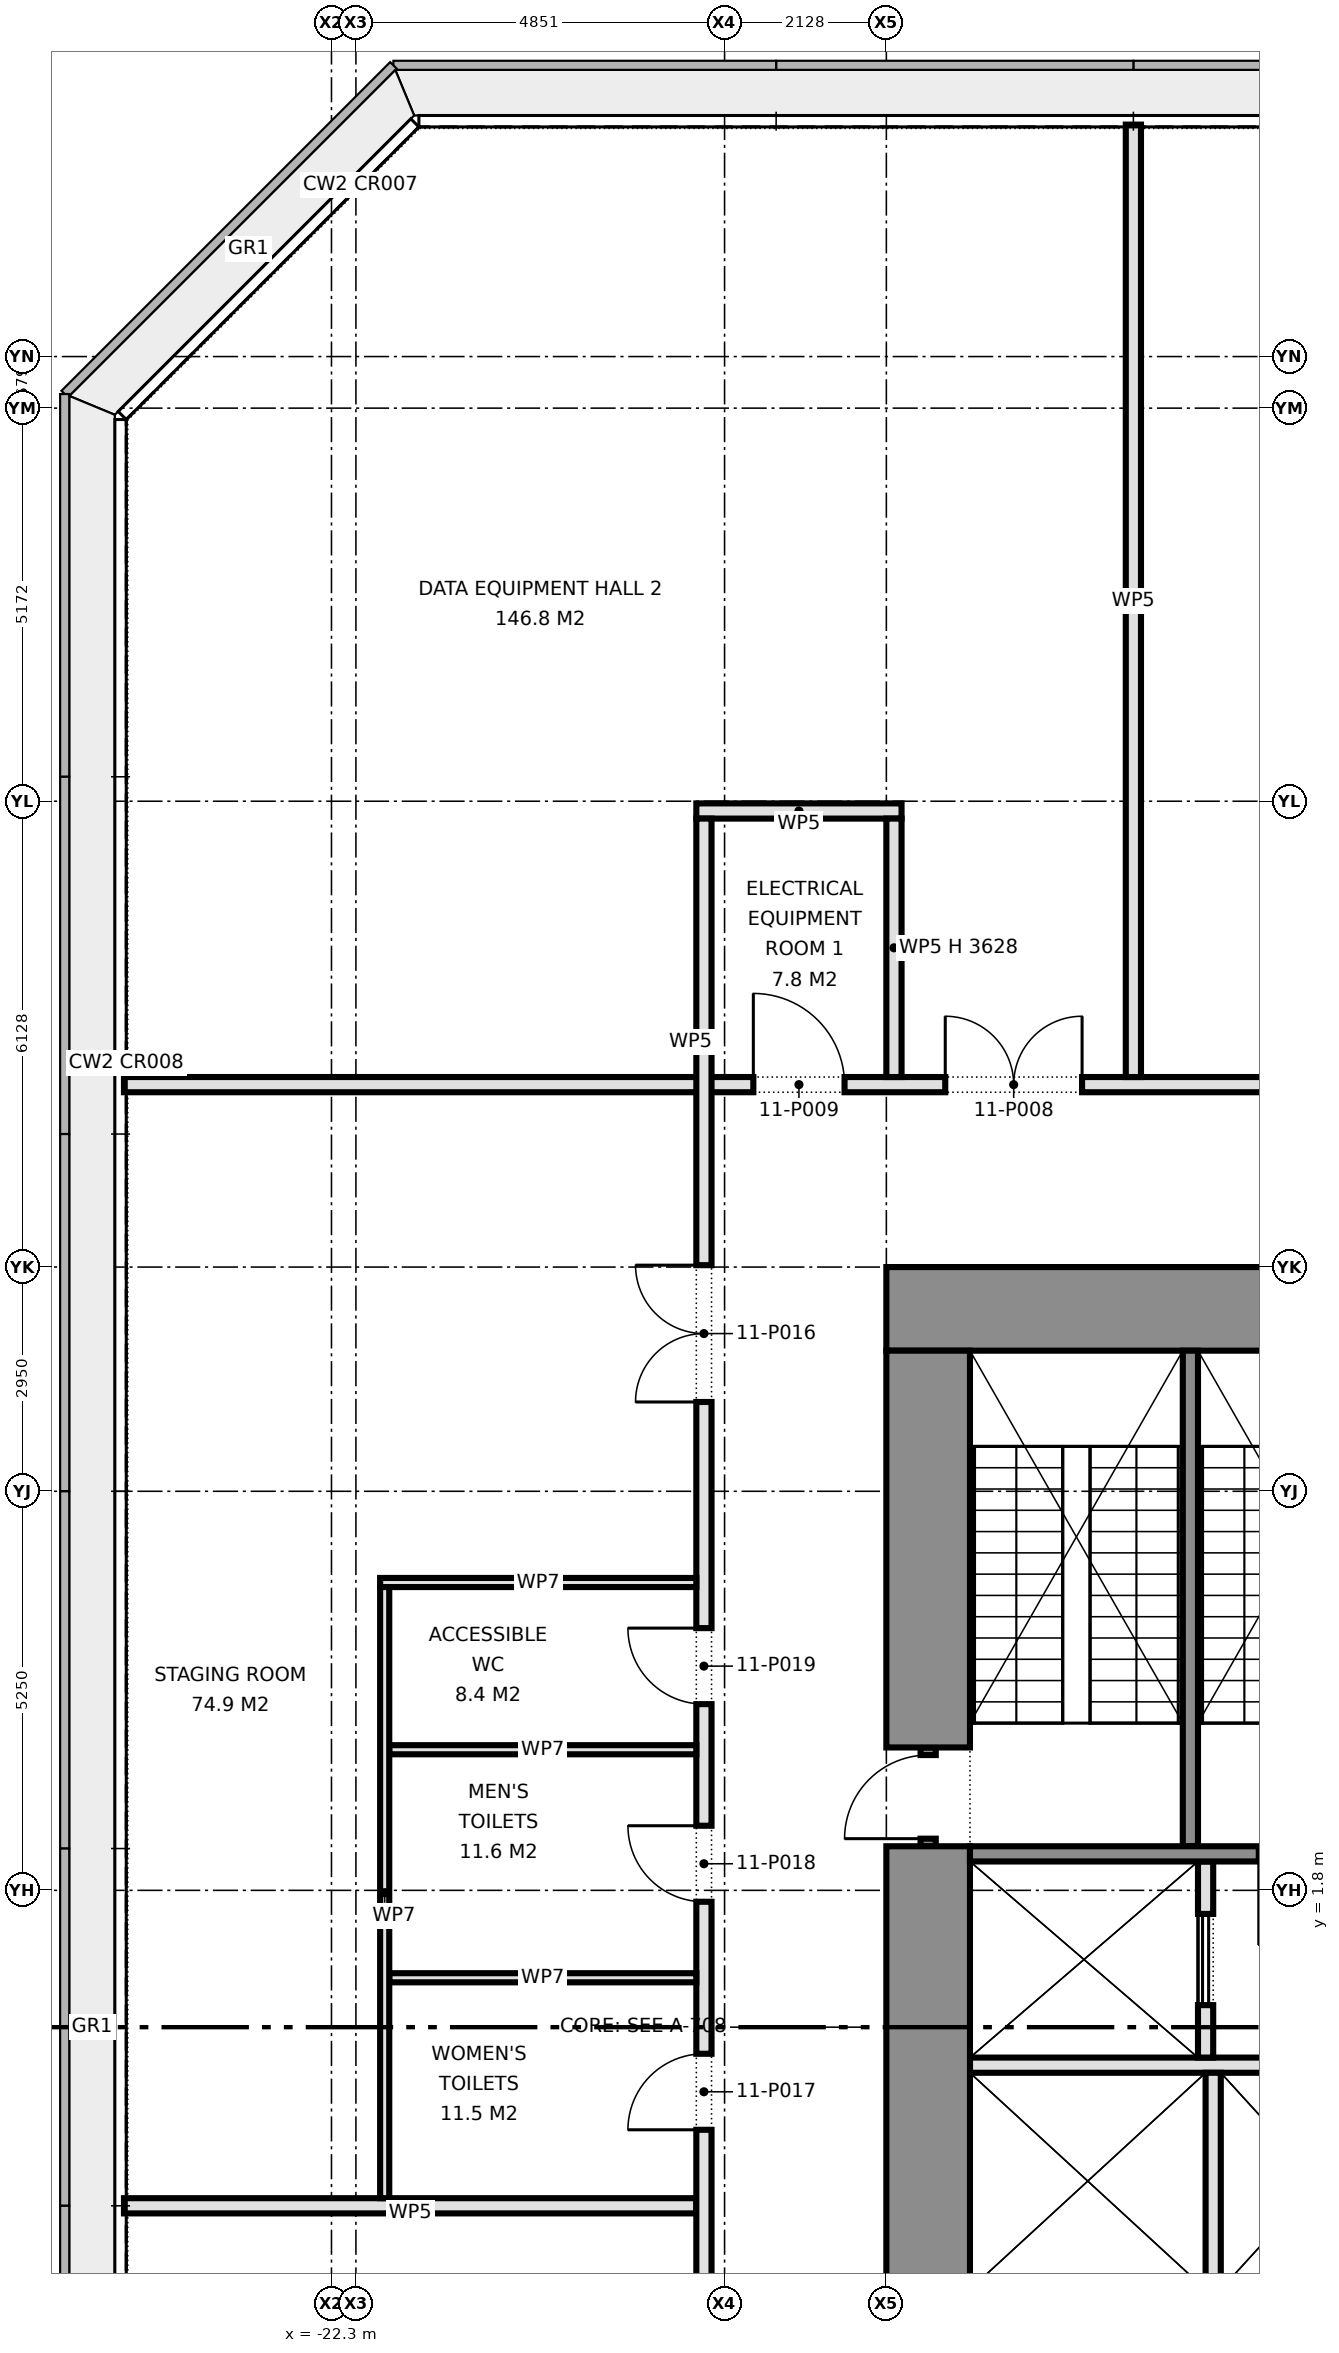
"""IFC4 building model, lengths in metres.
Left out: names, types, materials, properties, quantities, classifications, styles, units other than length and angle.
Written with IfcOpenShell. Run it as: python <this file> out.ifc"""

import sys

from ifc_helpers import new_model, si_unit, direction, frame, frame_2d, origin, place, context, subcontext, project, spatial, rectangle, extrude, element, fill, save


model = new_model("IFC4")
c1 = context("Model", 3, precision=1e-05, world=origin(), true_north=direction((0.0, 1.0)))
c2 = subcontext(c1, "Body", "Model", "MODEL_VIEW")
j1 = project(units=[si_unit("LENGTHUNIT", "METRE"), si_unit("PLANEANGLEUNIT", "RADIAN")], contexts=[c1])
p1 = place(None, origin())
s1 = spatial("IfcSite", under=j1, at=p1, CompositionType="ELEMENT")
p2 = place(p1, origin())
s2 = spatial("IfcBuilding", under=s1, at=p2, CompositionType="ELEMENT")
p3 = place(p2, frame((0.0, 0.0, 49.7)))
s3 = spatial("IfcBuildingStorey", under=s2, at=p3, CompositionType="ELEMENT", Elevation=49.7)
p4 = place(p3, frame((-15.0, 9.45, 0.0), z_axis=(0.0, 0.0, 1.0), x_axis=(1.0, 0.0, 0.0)))
e1 = element("IfcWall", 1, at=p4, inside=s3, PredefinedType="SHEAR", context=c2, shape_type="SweptSolid", body=[
    extrude(rectangle(XDim=11.0, YDim=1.1, at=frame_2d((5.5, 0.0))), origin(), (0.0, 0.0, 1.0), 4.575),
])
p5 = place(p3, frame((-14.45, -3.75, 0.0), z_axis=(0.0, 0.0, 1.0), x_axis=(0.0, 1.0, 0.0)))
e2 = element("IfcWall", 2, at=p5, inside=s3, PredefinedType="SHEAR", context=c2, shape_type="SweptSolid", body=[
    extrude(rectangle(XDim=6.13, YDim=1.1, at=frame_2d((3.065, 0.0))), origin(), (0.0, 0.0, 1.0), 4.575),
])
p6 = place(p3, frame((-14.45, 2.38, 0.0), z_axis=(0.0, 0.0, 1.0), x_axis=(0.0, 1.0, 0.0)))
e3 = element("IfcWall", 3, at=p6, inside=s3, PredefinedType="SHEAR", context=c2, shape_type="SweptSolid", body=[
    extrude(rectangle(XDim=1.3, YDim=0.2, at=frame_2d((0.65, 0.0))), origin(), (0.0, 0.0, 1.0), 2.4),
])
p7 = place(p6, frame((0.1, 0.0, 0.0)))
e4 = element("IfcOpeningElement", 4, at=p7, cuts=e3, PredefinedType="OPENING", context=c2, shape_type="SweptSolid", body=[
    extrude(rectangle(XDim=1.1, YDim=2.1, at=frame_2d((0.55, 1.05))), frame((0.0, 0.11, 0.0), z_axis=(0.0, -1.0, 0.0), x_axis=(1.0, 0.0, 0.0)), (0.0, 0.0, 1.0), 0.22),
])
p8 = place(p3, frame((-14.45, 3.68, 0.0), z_axis=(0.0, 0.0, 1.0), x_axis=(0.0, 1.0, 0.0)))
e5 = element("IfcWall", 5, at=p8, inside=s3, PredefinedType="SHEAR", context=c2, shape_type="SweptSolid", body=[
    extrude(rectangle(XDim=5.22, YDim=1.1, at=frame_2d((2.61, 0.0))), origin(), (0.0, 0.0, 1.0), 4.575),
])
p9 = place(p3, frame((-13.9, -0.5, 0.0), z_axis=(0.0, 0.0, 1.0), x_axis=(1.0, 0.0, 0.0)))
e6 = element("IfcWall", 6, at=p9, inside=s3, PredefinedType="PARTITIONING", context=c2, shape_type="SweptSolid", body=[
    extrude(rectangle(XDim=8.8, YDim=0.2, at=frame_2d((4.4, 0.0))), origin(), (0.0, 0.0, 1.0), 4.575),
])
p10 = place(p3, frame((-10.8, -0.4, 0.0), z_axis=(0.0, 0.0, 1.0), x_axis=(0.0, 1.0, 0.0)))
e7 = element("IfcWall", 7, at=p10, inside=s3, PredefinedType="PARTITIONING", context=c2, shape_type="SweptSolid", body=[
    extrude(rectangle(XDim=2.58, YDim=0.2, at=frame_2d((1.29, 0.0))), origin(), (0.0, 0.0, 1.0), 4.575),
])
p11 = place(p10, frame((0.69, 0.0, 0.0)))
e8 = element("IfcOpeningElement", 8, at=p11, cuts=e7, PredefinedType="OPENING", context=c2, shape_type="SweptSolid", body=[
    extrude(rectangle(XDim=1.2, YDim=2.1, at=frame_2d((0.6, 1.05))), frame((0.0, 0.11, 0.0), z_axis=(0.0, -1.0, 0.0), x_axis=(1.0, 0.0, 0.0)), (0.0, 0.0, 1.0), 0.22),
])
p12 = place(p3, frame((-13.9, 2.28, 0.0), z_axis=(0.0, 0.0, 1.0), x_axis=(1.0, 0.0, 0.0)))
e9 = element("IfcWall", 9, at=p12, inside=s3, PredefinedType="SHEAR", context=c2, shape_type="SweptSolid", body=[
    extrude(rectangle(XDim=8.8, YDim=0.2, at=frame_2d((4.4, 0.0))), origin(), (0.0, 0.0, 1.0), 4.575),
])
p13 = place(p12, frame((3.8, 0.0, 0.0)))
e10 = element("IfcOpeningElement", 10, at=p13, cuts=e9, PredefinedType="OPENING", context=c2, shape_type="SweptSolid", body=[
    extrude(rectangle(XDim=1.2, YDim=2.1, at=frame_2d((0.6, 1.05))), frame((0.0, 0.11, 0.0), z_axis=(0.0, -1.0, 0.0), x_axis=(1.0, 0.0, 0.0)), (0.0, 0.0, 1.0), 0.22),
])
p14 = place(p12, frame((6.8, 0.0, 0.0)))
e11 = element("IfcOpeningElement", 11, at=p14, cuts=e9, PredefinedType="OPENING", context=c2, shape_type="SweptSolid", body=[
    extrude(rectangle(XDim=1.2, YDim=2.1, at=frame_2d((0.6, 1.05))), frame((0.0, 0.11, 0.0), z_axis=(0.0, -1.0, 0.0), x_axis=(1.0, 0.0, 0.0)), (0.0, 0.0, 1.0), 0.22),
])
p15 = place(p3, frame((-11.0, 2.38, 0.0), z_axis=(0.0, 0.0, 1.0), x_axis=(0.0, 1.0, 0.0)))
e12 = element("IfcWall", 12, at=p15, inside=s3, PredefinedType="SHEAR", context=c2, shape_type="SweptSolid", body=[
    extrude(rectangle(XDim=6.52, YDim=0.2, at=frame_2d((3.26, 0.0))), origin(), (0.0, 0.0, 1.0), 4.575),
])
p16 = place(p3, frame((-10.7, -3.45, 0.0), z_axis=(0.0, 0.0, 1.0), x_axis=(0.0, 1.0, 0.0)))
e13 = element("IfcWall", 13, at=p16, inside=s3, PredefinedType="PARTITIONING", context=c2, shape_type="SweptSolid", body=[
    extrude(rectangle(XDim=2.85, YDim=0.2, at=frame_2d((1.425, 0.0))), origin(), (0.0, 0.0, 1.0), 4.575),
])
p17 = place(p3, frame((-25.03, -2.35, 0.0), z_axis=(0.0, 0.0, 1.0), x_axis=(1.0, 0.0, 0.0)))
e14 = element("IfcWall", 14, at=p17, inside=s3, PredefinedType="PARTITIONING", context=c2, shape_type="SweptSolid", body=[
    extrude(rectangle(XDim=7.53, YDim=0.2, at=frame_2d((3.765, 0.0))), origin(), (0.0, 0.0, 1.0), 4.575),
])
p18 = place(p3, frame((-25.03, 12.4, 0.0), z_axis=(0.0, 0.0, 1.0), x_axis=(1.0, 0.0, 0.0)))
e15 = element("IfcWall", 15, at=p18, inside=s3, PredefinedType="PARTITIONING", context=c2, shape_type="SweptSolid", body=[
    extrude(rectangle(XDim=50.06, YDim=0.2, at=frame_2d((25.03, 0.0))), origin(), (0.0, 0.0, 1.0), 4.575),
])
p19 = place(p18, frame((10.805, 0.0, 0.0)))
e16 = element("IfcOpeningElement", 16, at=p19, cuts=e15, PredefinedType="OPENING", context=c2, shape_type="SweptSolid", body=[
    extrude(rectangle(XDim=1.8, YDim=2.1, at=frame_2d((0.9, 1.05))), frame((0.0, 0.11, 0.0), z_axis=(0.0, -1.0, 0.0), x_axis=(1.0, 0.0, 0.0)), (0.0, 0.0, 1.0), 0.22),
])
p20 = place(p18, frame((8.28, 0.0, 0.0)))
e17 = element("IfcOpeningElement", 17, at=p20, cuts=e15, PredefinedType="OPENING", context=c2, shape_type="SweptSolid", body=[
    extrude(rectangle(XDim=1.2, YDim=2.1, at=frame_2d((0.6, 1.05))), frame((0.0, 0.11, 0.0), z_axis=(0.0, -1.0, 0.0), x_axis=(1.0, 0.0, 0.0)), (0.0, 0.0, 1.0), 0.22),
])
p21 = place(p18, frame((21.78, 0.0, 0.0)))
e18 = element("IfcOpeningElement", 18, at=p21, cuts=e15, PredefinedType="OPENING", context=c2, shape_type="SweptSolid", body=[
    extrude(rectangle(XDim=1.8, YDim=2.1, at=frame_2d((0.9, 1.05))), frame((0.0, 0.11, 0.0), z_axis=(0.0, -1.0, 0.0), x_axis=(1.0, 0.0, 0.0)), (0.0, 0.0, 1.0), 0.22),
])
p22 = place(p18, frame((36.36, 0.0, 0.0)))
e19 = element("IfcOpeningElement", 19, at=p22, cuts=e15, PredefinedType="OPENING", context=c2, shape_type="SweptSolid", body=[
    extrude(rectangle(XDim=1.8, YDim=2.1, at=frame_2d((0.9, 1.05))), frame((0.0, 0.11, 0.0), z_axis=(0.0, -1.0, 0.0), x_axis=(1.0, 0.0, 0.0)), (0.0, 0.0, 1.0), 0.22),
])
p23 = place(p3, frame((-17.5, 16.0, 0.0), z_axis=(0.0, 0.0, 1.0), x_axis=(1.0, 0.0, 0.0)))
e20 = element("IfcWall", 20, at=p23, inside=s3, PredefinedType="PARTITIONING", context=c2, shape_type="SweptSolid", body=[
    extrude(rectangle(XDim=2.7, YDim=0.2, at=frame_2d((1.35, 0.0))), origin(), (0.0, 0.0, 1.0), 4.575),
])
p24 = place(p3, frame((-11.75, 12.5, 0.0), z_axis=(0.0, 0.0, 1.0), x_axis=(0.0, 1.0, 0.0)))
e21 = element("IfcWall", 21, at=p24, inside=s3, PredefinedType="PARTITIONING", context=c2, shape_type="SweptSolid", body=[
    extrude(rectangle(XDim=12.53, YDim=0.2, at=frame_2d((6.265, 0.0))), origin(), (0.0, 0.0, 1.0), 4.575),
])
p25 = place(p3, frame((-14.9, 12.5, 0.0), z_axis=(0.0, 0.0, 1.0), x_axis=(0.0, 1.0, 0.0)))
e22 = element("IfcWall", 22, at=p25, inside=s3, PredefinedType="PARTITIONING", context=c2, shape_type="SweptSolid", body=[
    extrude(rectangle(XDim=3.4, YDim=0.2, at=frame_2d((1.7, 0.0))), origin(), (0.0, 0.0, 1.0), 3.628),
])
p26 = place(p3, frame((-17.4, -12.3, 0.0), z_axis=(0.0, 0.0, 1.0), x_axis=(0.0, 1.0, 0.0)))
e23 = element("IfcWall", 23, at=p26, inside=s3, PredefinedType="PARTITIONING", context=c2, shape_type="SweptSolid", body=[
    extrude(rectangle(XDim=28.2, YDim=0.2, at=frame_2d((14.1, 0.0))), origin(), (0.0, 0.0, 1.0), 4.575),
])
p27 = place(p26, frame((4.025, 0.0, 0.0)))
e24 = element("IfcOpeningElement", 24, at=p27, cuts=e23, PredefinedType="OPENING", context=c2, shape_type="SweptSolid", body=[
    extrude(rectangle(XDim=1.8, YDim=2.1, at=frame_2d((0.9, 1.05))), frame((0.0, 0.11, 0.0), z_axis=(0.0, -1.0, 0.0), x_axis=(1.0, 0.0, 0.0)), (0.0, 0.0, 1.0), 0.22),
])
p28 = place(p26, frame((20.525, 0.0, 0.0)))
e25 = element("IfcOpeningElement", 25, at=p28, cuts=e23, PredefinedType="OPENING", context=c2, shape_type="SweptSolid", body=[
    extrude(rectangle(XDim=1.8, YDim=2.1, at=frame_2d((0.9, 1.05))), frame((0.0, 0.11, 0.0), z_axis=(0.0, -1.0, 0.0), x_axis=(1.0, 0.0, 0.0)), (0.0, 0.0, 1.0), 0.22),
])
p29 = place(p26, frame((10.95, 0.0, 0.0)))
e26 = element("IfcOpeningElement", 26, at=p29, cuts=e23, PredefinedType="OPENING", context=c2, shape_type="SweptSolid", body=[
    extrude(rectangle(XDim=1.0, YDim=2.1, at=frame_2d((0.5, 1.05))), frame((0.0, 0.11, 0.0), z_axis=(0.0, -1.0, 0.0), x_axis=(1.0, 0.0, 0.0)), (0.0, 0.0, 1.0), 0.22),
])
p30 = place(p26, frame((13.95, 0.0, 0.0)))
e27 = element("IfcOpeningElement", 27, at=p30, cuts=e23, PredefinedType="OPENING", context=c2, shape_type="SweptSolid", body=[
    extrude(rectangle(XDim=1.0, YDim=2.1, at=frame_2d((0.5, 1.05))), frame((0.0, 0.11, 0.0), z_axis=(0.0, -1.0, 0.0), x_axis=(1.0, 0.0, 0.0)), (0.0, 0.0, 1.0), 0.22),
])
p31 = place(p26, frame((16.55, 0.0, 0.0)))
e28 = element("IfcOpeningElement", 28, at=p31, cuts=e23, PredefinedType="OPENING", context=c2, shape_type="SweptSolid", body=[
    extrude(rectangle(XDim=1.0, YDim=2.1, at=frame_2d((0.5, 1.05))), frame((0.0, 0.11, 0.0), z_axis=(0.0, -1.0, 0.0), x_axis=(1.0, 0.0, 0.0)), (0.0, 0.0, 1.0), 0.22),
])
for number, where, z_axis, x_axis in (
    (29, (-21.54, 0.65, 0.0), (0.0, 0.0, 1.0), (1.0, 0.0, 0.0)),
    (30, (-21.54, 3.65, 0.0), (0.0, 0.0, 1.0), (1.0, 0.0, 0.0)),
):
    element("IfcWall", number, at=place(p3, frame(where, z_axis=z_axis, x_axis=x_axis)), inside=s3, PredefinedType="PARTITIONING", context=c2, shape_type="SweptSolid", body=[
        extrude(rectangle(XDim=4.04, YDim=0.12, at=frame_2d((2.02, 0.0))), origin(), (0.0, 0.0, 1.0), 4.575),
    ])
p32 = place(p3, frame((-21.66, 5.85, 0.0), z_axis=(0.0, 0.0, 1.0), x_axis=(1.0, 0.0, 0.0)))
e31 = element("IfcWall", 31, at=p32, inside=s3, PredefinedType="PARTITIONING", context=c2, shape_type="SweptSolid", body=[
    extrude(rectangle(XDim=4.16, YDim=0.12, at=frame_2d((2.08, 0.0))), origin(), (0.0, 0.0, 1.0), 4.575),
])
p33 = place(p3, frame((-21.6, -2.25, 0.0), z_axis=(0.0, 0.0, 1.0), x_axis=(0.0, 1.0, 0.0)))
e32 = element("IfcWall", 32, at=p33, inside=s3, PredefinedType="PARTITIONING", context=c2, shape_type="SweptSolid", body=[
    extrude(rectangle(XDim=8.04, YDim=0.12, at=frame_2d((4.02, 0.0))), origin(), (0.0, 0.0, 1.0), 4.575),
])
p34 = place(p7, origin())
e33 = element("IfcDoor", 33, at=p34, inside=s3, OperationType="SINGLE_SWING_LEFT", PredefinedType="DOOR", context=c2, shape_type="SweptSolid", body=[
    extrude(rectangle(XDim=1.1, YDim=2.1, at=frame_2d((0.55, 1.05))), frame((0.0, 0.025, 0.0), z_axis=(0.0, -1.0, 0.0), x_axis=(1.0, 0.0, 0.0)), (0.0, 0.0, 1.0), 0.05),
])
fill(e4, e33)
p35 = place(p11, origin())
e34 = element("IfcDoor", 34, at=p35, inside=s3, OperationType="DOUBLE_DOOR_SLIDING", PredefinedType="DOOR", context=c2, shape_type="SweptSolid", body=[
    extrude(rectangle(XDim=1.2, YDim=2.1, at=frame_2d((0.6, 1.05))), frame((0.0, 0.025, 0.0), z_axis=(0.0, -1.0, 0.0), x_axis=(1.0, 0.0, 0.0)), (0.0, 0.0, 1.0), 0.05),
])
fill(e8, e34)
p36 = place(p19, origin())
e35 = element("IfcDoor", 35, at=p36, inside=s3, OperationType="DOUBLE_DOOR_SINGLE_SWING", PredefinedType="DOOR", context=c2, shape_type="SweptSolid", body=[
    extrude(rectangle(XDim=1.8, YDim=2.1, at=frame_2d((0.9, 1.05))), frame((0.0, 0.025, 0.0), z_axis=(0.0, -1.0, 0.0), x_axis=(1.0, 0.0, 0.0)), (0.0, 0.0, 1.0), 0.05),
])
fill(e16, e35)
p37 = place(p20, origin())
e36 = element("IfcDoor", 36, at=p37, inside=s3, OperationType="SINGLE_SWING_LEFT", PredefinedType="DOOR", context=c2, shape_type="SweptSolid", body=[
    extrude(rectangle(XDim=1.2, YDim=2.1, at=frame_2d((0.6, 1.05))), frame((0.0, 0.025, 0.0), z_axis=(0.0, -1.0, 0.0), x_axis=(1.0, 0.0, 0.0)), (0.0, 0.0, 1.0), 0.05),
])
fill(e17, e36)
p38 = place(p28, origin())
e37 = element("IfcDoor", 37, at=p38, inside=s3, OperationType="DOUBLE_DOOR_SINGLE_SWING", PredefinedType="DOOR", context=c2, shape_type="SweptSolid", body=[
    extrude(rectangle(XDim=1.8, YDim=2.1, at=frame_2d((0.9, 1.05))), frame((0.0, 0.025, 0.0), z_axis=(0.0, -1.0, 0.0), x_axis=(1.0, 0.0, 0.0)), (0.0, 0.0, 1.0), 0.05),
])
fill(e25, e37)
p39 = place(p29, origin())
e38 = element("IfcDoor", 38, at=p39, inside=s3, OperationType="SINGLE_SWING_LEFT", PredefinedType="DOOR", context=c2, shape_type="SweptSolid", body=[
    extrude(rectangle(XDim=1.0, YDim=2.1, at=frame_2d((0.5, 1.05))), frame((0.0, 0.025, 0.0), z_axis=(0.0, -1.0, 0.0), x_axis=(1.0, 0.0, 0.0)), (0.0, 0.0, 1.0), 0.05),
])
fill(e26, e38)
p40 = place(p30, origin())
e39 = element("IfcDoor", 39, at=p40, inside=s3, OperationType="SINGLE_SWING_RIGHT", PredefinedType="DOOR", context=c2, shape_type="SweptSolid", body=[
    extrude(rectangle(XDim=1.0, YDim=2.1, at=frame_2d((0.5, 1.05))), frame((0.0, 0.025, 0.0), z_axis=(0.0, -1.0, 0.0), x_axis=(1.0, 0.0, 0.0)), (0.0, 0.0, 1.0), 0.05),
])
fill(e27, e39)
p41 = place(p31, origin())
e40 = element("IfcDoor", 40, at=p41, inside=s3, OperationType="SINGLE_SWING_RIGHT", PredefinedType="DOOR", context=c2, shape_type="SweptSolid", body=[
    extrude(rectangle(XDim=1.0, YDim=2.1, at=frame_2d((0.5, 1.05))), frame((0.0, 0.025, 0.0), z_axis=(0.0, -1.0, 0.0), x_axis=(1.0, 0.0, 0.0)), (0.0, 0.0, 1.0), 0.05),
])
fill(e28, e40)
save(model, sys.argv[1])
